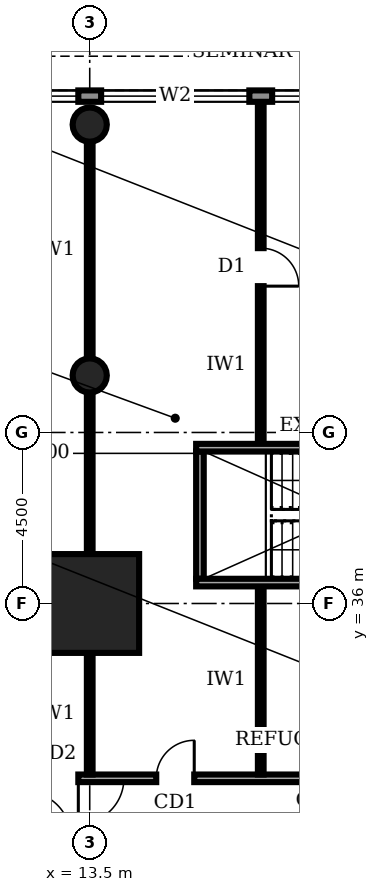
"""IFC4 building model, lengths in metres.
Left out: names, types, materials, properties, quantities, classifications, styles, units other than length and angle.
Written with IfcOpenShell. Run it as: python <this file> out.ifc"""

import sys

from ifc_helpers import new_model, si_unit, direction, frame, frame_2d, origin, origin_2d, place, context, subcontext, project, spatial, rectangle, circle, extrude, element, fill, save


model = new_model("IFC4")
c1 = context("Model", 3, precision=1e-05, world=origin(), true_north=direction((0.0, 1.0)))
c2 = subcontext(c1, "Body", "Model", "MODEL_VIEW")
j1 = project(units=[si_unit("LENGTHUNIT", "METRE"), si_unit("PLANEANGLEUNIT", "RADIAN")], contexts=[c1])
p1 = place(None, origin())
s1 = spatial("IfcSite", under=j1, at=p1, CompositionType="ELEMENT")
p2 = place(p1, origin())
s2 = spatial("IfcBuilding", under=s1, at=p2, CompositionType="ELEMENT")
p3 = place(p2, frame((0.0, 0.0, 6.0)))
s3 = spatial("IfcBuildingStorey", under=s2, at=p3, CompositionType="ELEMENT", Elevation=6.0)
p4 = place(p3, frame((13.5, 36.0, 0.0), z_axis=(0.0, 0.0, 1.0), x_axis=(1.0, 0.0, 0.0)))
e1 = element("IfcColumn", 1, at=p4, inside=s3, PredefinedType="COLUMN", context=c2, shape_type="SweptSolid", body=[
    extrude(rectangle(XDim=2.6, YDim=2.6, at=origin_2d()), origin(), (0.0, 0.0, 1.0), 5.0),
])
for number, where, z_axis, x_axis in (
    (2, (13.5, 42.0, 0.0), (0.0, 0.0, 1.0), (1.0, 0.0, 0.0)),
    (3, (13.5, 48.6, 0.0), (0.0, 0.0, 1.0), (1.0, 0.0, 0.0)),
):
    element("IfcColumn", number, at=place(p3, frame(where, z_axis=z_axis, x_axis=x_axis)), inside=s3, PredefinedType="COLUMN", context=c2, shape_type="SweptSolid", body=[
        extrude(circle(Radius=0.45, at=origin_2d()), origin(), (0.0, 0.0, 1.0), 5.0),
    ])
p5 = place(p3, frame((98.98, 49.35, 0.0), z_axis=(0.0, 0.0, 1.0), x_axis=(-1.0, 0.0, 0.0)))
e4 = element("IfcWall", 4, at=p5, inside=s3, PredefinedType="STANDARD", context=c2, shape_type="SweptSolid", body=[
    extrude(rectangle(XDim=98.96, YDim=0.3, at=frame_2d((49.48, 0.0))), origin(), (0.0, 0.0, 1.0), 4.7),
])
p6 = place(p5, frame((94.78, 0.0, 0.6)))
e5 = element("IfcOpeningElement", 5, at=p6, cuts=e4, PredefinedType="OPENING", context=c2, shape_type="SweptSolid", body=[
    extrude(rectangle(XDim=3.9, YDim=2.6, at=frame_2d((1.95, 1.3))), frame((0.0, 0.16, 0.0), z_axis=(0.0, -1.0, 0.0), x_axis=(1.0, 0.0, 0.0)), (0.0, 0.0, 1.0), 0.32),
])
p7 = place(p5, frame((90.28, 0.0, 0.6)))
e6 = element("IfcOpeningElement", 6, at=p7, cuts=e4, PredefinedType="OPENING", context=c2, shape_type="SweptSolid", body=[
    extrude(rectangle(XDim=3.9, YDim=2.6, at=frame_2d((1.95, 1.3))), frame((0.0, 0.16, 0.0), z_axis=(0.0, -1.0, 0.0), x_axis=(1.0, 0.0, 0.0)), (0.0, 0.0, 1.0), 0.32),
])
p8 = place(p5, frame((85.78, 0.0, 0.6)))
e7 = element("IfcOpeningElement", 7, at=p8, cuts=e4, PredefinedType="OPENING", context=c2, shape_type="SweptSolid", body=[
    extrude(rectangle(XDim=3.9, YDim=2.6, at=frame_2d((1.95, 1.3))), frame((0.0, 0.16, 0.0), z_axis=(0.0, -1.0, 0.0), x_axis=(1.0, 0.0, 0.0)), (0.0, 0.0, 1.0), 0.32),
])
p9 = place(p5, frame((81.28, 0.0, 0.6)))
e8 = element("IfcOpeningElement", 8, at=p9, cuts=e4, PredefinedType="OPENING", context=c2, shape_type="SweptSolid", body=[
    extrude(rectangle(XDim=3.9, YDim=2.6, at=frame_2d((1.95, 1.3))), frame((0.0, 0.16, 0.0), z_axis=(0.0, -1.0, 0.0), x_axis=(1.0, 0.0, 0.0)), (0.0, 0.0, 1.0), 0.32),
])
p10 = place(p5, frame((76.78, 0.0, 0.6)))
e9 = element("IfcOpeningElement", 9, at=p10, cuts=e4, PredefinedType="OPENING", context=c2, shape_type="SweptSolid", body=[
    extrude(rectangle(XDim=3.9, YDim=2.6, at=frame_2d((1.95, 1.3))), frame((0.0, 0.16, 0.0), z_axis=(0.0, -1.0, 0.0), x_axis=(1.0, 0.0, 0.0)), (0.0, 0.0, 1.0), 0.32),
])
p11 = place(p5, frame((72.28, 0.0, 0.6)))
e10 = element("IfcOpeningElement", 10, at=p11, cuts=e4, PredefinedType="OPENING", context=c2, shape_type="SweptSolid", body=[
    extrude(rectangle(XDim=3.9, YDim=2.6, at=frame_2d((1.95, 1.3))), frame((0.0, 0.16, 0.0), z_axis=(0.0, -1.0, 0.0), x_axis=(1.0, 0.0, 0.0)), (0.0, 0.0, 1.0), 0.32),
])
p12 = place(p5, frame((67.78, 0.0, 0.6)))
e11 = element("IfcOpeningElement", 11, at=p12, cuts=e4, PredefinedType="OPENING", context=c2, shape_type="SweptSolid", body=[
    extrude(rectangle(XDim=3.9, YDim=2.6, at=frame_2d((1.95, 1.3))), frame((0.0, 0.16, 0.0), z_axis=(0.0, -1.0, 0.0), x_axis=(1.0, 0.0, 0.0)), (0.0, 0.0, 1.0), 0.32),
])
p13 = place(p5, frame((63.28, 0.0, 0.6)))
e12 = element("IfcOpeningElement", 12, at=p13, cuts=e4, PredefinedType="OPENING", context=c2, shape_type="SweptSolid", body=[
    extrude(rectangle(XDim=3.9, YDim=2.6, at=frame_2d((1.95, 1.3))), frame((0.0, 0.16, 0.0), z_axis=(0.0, -1.0, 0.0), x_axis=(1.0, 0.0, 0.0)), (0.0, 0.0, 1.0), 0.32),
])
p14 = place(p5, frame((58.78, 0.0, 0.6)))
e13 = element("IfcOpeningElement", 13, at=p14, cuts=e4, PredefinedType="OPENING", context=c2, shape_type="SweptSolid", body=[
    extrude(rectangle(XDim=3.9, YDim=2.6, at=frame_2d((1.95, 1.3))), frame((0.0, 0.16, 0.0), z_axis=(0.0, -1.0, 0.0), x_axis=(1.0, 0.0, 0.0)), (0.0, 0.0, 1.0), 0.32),
])
p15 = place(p5, frame((54.28, 0.0, 0.6)))
e14 = element("IfcOpeningElement", 14, at=p15, cuts=e4, PredefinedType="OPENING", context=c2, shape_type="SweptSolid", body=[
    extrude(rectangle(XDim=3.9, YDim=2.6, at=frame_2d((1.95, 1.3))), frame((0.0, 0.16, 0.0), z_axis=(0.0, -1.0, 0.0), x_axis=(1.0, 0.0, 0.0)), (0.0, 0.0, 1.0), 0.32),
])
p16 = place(p5, frame((49.78, 0.0, 0.6)))
e15 = element("IfcOpeningElement", 15, at=p16, cuts=e4, PredefinedType="OPENING", context=c2, shape_type="SweptSolid", body=[
    extrude(rectangle(XDim=3.9, YDim=2.6, at=frame_2d((1.95, 1.3))), frame((0.0, 0.16, 0.0), z_axis=(0.0, -1.0, 0.0), x_axis=(1.0, 0.0, 0.0)), (0.0, 0.0, 1.0), 0.32),
])
p17 = place(p5, frame((45.28, 0.0, 0.6)))
e16 = element("IfcOpeningElement", 16, at=p17, cuts=e4, PredefinedType="OPENING", context=c2, shape_type="SweptSolid", body=[
    extrude(rectangle(XDim=3.9, YDim=2.6, at=frame_2d((1.95, 1.3))), frame((0.0, 0.16, 0.0), z_axis=(0.0, -1.0, 0.0), x_axis=(1.0, 0.0, 0.0)), (0.0, 0.0, 1.0), 0.32),
])
p18 = place(p5, frame((40.78, 0.0, 0.6)))
e17 = element("IfcOpeningElement", 17, at=p18, cuts=e4, PredefinedType="OPENING", context=c2, shape_type="SweptSolid", body=[
    extrude(rectangle(XDim=3.9, YDim=2.6, at=frame_2d((1.95, 1.3))), frame((0.0, 0.16, 0.0), z_axis=(0.0, -1.0, 0.0), x_axis=(1.0, 0.0, 0.0)), (0.0, 0.0, 1.0), 0.32),
])
p19 = place(p5, frame((36.28, 0.0, 0.6)))
e18 = element("IfcOpeningElement", 18, at=p19, cuts=e4, PredefinedType="OPENING", context=c2, shape_type="SweptSolid", body=[
    extrude(rectangle(XDim=3.9, YDim=2.6, at=frame_2d((1.95, 1.3))), frame((0.0, 0.16, 0.0), z_axis=(0.0, -1.0, 0.0), x_axis=(1.0, 0.0, 0.0)), (0.0, 0.0, 1.0), 0.32),
])
p20 = place(p5, frame((31.78, 0.0, 0.6)))
e19 = element("IfcOpeningElement", 19, at=p20, cuts=e4, PredefinedType="OPENING", context=c2, shape_type="SweptSolid", body=[
    extrude(rectangle(XDim=3.9, YDim=2.6, at=frame_2d((1.95, 1.3))), frame((0.0, 0.16, 0.0), z_axis=(0.0, -1.0, 0.0), x_axis=(1.0, 0.0, 0.0)), (0.0, 0.0, 1.0), 0.32),
])
p21 = place(p5, frame((27.28, 0.0, 0.6)))
e20 = element("IfcOpeningElement", 20, at=p21, cuts=e4, PredefinedType="OPENING", context=c2, shape_type="SweptSolid", body=[
    extrude(rectangle(XDim=3.9, YDim=2.6, at=frame_2d((1.95, 1.3))), frame((0.0, 0.16, 0.0), z_axis=(0.0, -1.0, 0.0), x_axis=(1.0, 0.0, 0.0)), (0.0, 0.0, 1.0), 0.32),
])
p22 = place(p5, frame((22.78, 0.0, 0.6)))
e21 = element("IfcOpeningElement", 21, at=p22, cuts=e4, PredefinedType="OPENING", context=c2, shape_type="SweptSolid", body=[
    extrude(rectangle(XDim=3.9, YDim=2.6, at=frame_2d((1.95, 1.3))), frame((0.0, 0.16, 0.0), z_axis=(0.0, -1.0, 0.0), x_axis=(1.0, 0.0, 0.0)), (0.0, 0.0, 1.0), 0.32),
])
p23 = place(p5, frame((18.28, 0.0, 0.6)))
e22 = element("IfcOpeningElement", 22, at=p23, cuts=e4, PredefinedType="OPENING", context=c2, shape_type="SweptSolid", body=[
    extrude(rectangle(XDim=3.9, YDim=2.6, at=frame_2d((1.95, 1.3))), frame((0.0, 0.16, 0.0), z_axis=(0.0, -1.0, 0.0), x_axis=(1.0, 0.0, 0.0)), (0.0, 0.0, 1.0), 0.32),
])
p24 = place(p5, frame((13.78, 0.0, 0.6)))
e23 = element("IfcOpeningElement", 23, at=p24, cuts=e4, PredefinedType="OPENING", context=c2, shape_type="SweptSolid", body=[
    extrude(rectangle(XDim=3.9, YDim=2.6, at=frame_2d((1.95, 1.3))), frame((0.0, 0.16, 0.0), z_axis=(0.0, -1.0, 0.0), x_axis=(1.0, 0.0, 0.0)), (0.0, 0.0, 1.0), 0.32),
])
p25 = place(p5, frame((9.28, 0.0, 0.6)))
e24 = element("IfcOpeningElement", 24, at=p25, cuts=e4, PredefinedType="OPENING", context=c2, shape_type="SweptSolid", body=[
    extrude(rectangle(XDim=3.9, YDim=2.6, at=frame_2d((1.95, 1.3))), frame((0.0, 0.16, 0.0), z_axis=(0.0, -1.0, 0.0), x_axis=(1.0, 0.0, 0.0)), (0.0, 0.0, 1.0), 0.32),
])
p26 = place(p5, frame((4.78, 0.0, 0.6)))
e25 = element("IfcOpeningElement", 25, at=p26, cuts=e4, PredefinedType="OPENING", context=c2, shape_type="SweptSolid", body=[
    extrude(rectangle(XDim=3.9, YDim=2.6, at=frame_2d((1.95, 1.3))), frame((0.0, 0.16, 0.0), z_axis=(0.0, -1.0, 0.0), x_axis=(1.0, 0.0, 0.0)), (0.0, 0.0, 1.0), 0.32),
])
p27 = place(p3, frame((28.6, 31.4, 0.0), z_axis=(0.0, 0.0, 1.0), x_axis=(-1.0, 0.0, 0.0)))
e26 = element("IfcWall", 26, at=p27, inside=s3, PredefinedType="SOLIDWALL", context=c2, shape_type="SweptSolid", body=[
    extrude(rectangle(XDim=16.9, YDim=0.2, at=frame_2d((8.45, 0.0))), origin(), (0.0, 0.0, 1.0), 4.7),
])
p28 = place(p27, frame((15.4, 0.0, 0.0)))
e27 = element("IfcOpeningElement", 27, at=p28, cuts=e26, PredefinedType="OPENING", context=c2, shape_type="SweptSolid", body=[
    extrude(rectangle(XDim=1.2, YDim=2.4, at=frame_2d((0.6, 1.2))), frame((0.0, 0.11, 0.0), z_axis=(0.0, -1.0, 0.0), x_axis=(1.0, 0.0, 0.0)), (0.0, 0.0, 1.0), 0.22),
])
p29 = place(p27, frame((12.35, 0.0, 0.0)))
e28 = element("IfcOpeningElement", 28, at=p29, cuts=e26, PredefinedType="OPENING", context=c2, shape_type="SweptSolid", body=[
    extrude(rectangle(XDim=1.0, YDim=2.1, at=frame_2d((0.5, 1.05))), frame((0.0, 0.11, 0.0), z_axis=(0.0, -1.0, 0.0), x_axis=(1.0, 0.0, 0.0)), (0.0, 0.0, 1.0), 0.22),
])
p30 = place(p27, frame((7.85, 0.0, 0.0)))
e29 = element("IfcOpeningElement", 29, at=p30, cuts=e26, PredefinedType="OPENING", context=c2, shape_type="SweptSolid", body=[
    extrude(rectangle(XDim=1.0, YDim=2.1, at=frame_2d((0.5, 1.05))), frame((0.0, 0.11, 0.0), z_axis=(0.0, -1.0, 0.0), x_axis=(1.0, 0.0, 0.0)), (0.0, 0.0, 1.0), 0.22),
])
p31 = place(p27, frame((0.275, 0.0, 0.0)))
e30 = element("IfcOpeningElement", 30, at=p31, cuts=e26, PredefinedType="OPENING", context=c2, shape_type="SweptSolid", body=[
    extrude(rectangle(XDim=1.0, YDim=2.1, at=frame_2d((0.5, 1.05))), frame((0.0, 0.11, 0.0), z_axis=(0.0, -1.0, 0.0), x_axis=(1.0, 0.0, 0.0)), (0.0, 0.0, 1.0), 0.22),
])
p32 = place(p27, frame((3.35, 0.0, 0.0)))
e31 = element("IfcOpeningElement", 31, at=p32, cuts=e26, PredefinedType="OPENING", context=c2, shape_type="SweptSolid", body=[
    extrude(rectangle(XDim=1.0, YDim=2.1, at=frame_2d((0.5, 1.05))), frame((0.0, 0.11, 0.0), z_axis=(0.0, -1.0, 0.0), x_axis=(1.0, 0.0, 0.0)), (0.0, 0.0, 1.0), 0.22),
])
p33 = place(p3, frame((13.5, 31.5, 0.0), z_axis=(0.0, 0.0, 1.0), x_axis=(0.0, 1.0, 0.0)))
e32 = element("IfcWall", 32, at=p33, inside=s3, PredefinedType="PARTITIONING", context=c2, shape_type="SweptSolid", body=[
    extrude(rectangle(XDim=3.18, YDim=0.15, at=frame_2d((1.59, 0.0))), origin(), (0.0, 0.0, 1.0), 3.8),
])
p34 = place(p3, frame((13.5, 37.32, 0.0), z_axis=(0.0, 0.0, 1.0), x_axis=(0.0, 1.0, 0.0)))
e33 = element("IfcWall", 33, at=p34, inside=s3, PredefinedType="PARTITIONING", context=c2, shape_type="SweptSolid", body=[
    extrude(rectangle(XDim=4.21, YDim=0.15, at=frame_2d((2.105, 0.0))), origin(), (0.0, 0.0, 1.0), 3.7),
])
p35 = place(p3, frame((13.5, 42.47, 0.0), z_axis=(0.0, 0.0, 1.0), x_axis=(0.0, 1.0, 0.0)))
e34 = element("IfcWall", 34, at=p35, inside=s3, PredefinedType="PARTITIONING", context=c2, shape_type="SweptSolid", body=[
    extrude(rectangle(XDim=5.66, YDim=0.15, at=frame_2d((2.83, 0.0))), origin(), (0.0, 0.0, 1.0), 3.7),
])
p36 = place(p3, frame((18.0, 31.5, 0.0), z_axis=(0.0, 0.0, 1.0), x_axis=(0.0, 1.0, 0.0)))
e35 = element("IfcWall", 35, at=p36, inside=s3, PredefinedType="PARTITIONING", context=c2, shape_type="SweptSolid", body=[
    extrude(rectangle(XDim=4.95, YDim=0.15, at=frame_2d((2.475, 0.0))), origin(), (0.0, 0.0, 1.0), 4.7),
])
p37 = place(p3, frame((18.0, 40.2, 0.0), z_axis=(0.0, 0.0, 1.0), x_axis=(0.0, 1.0, 0.0)))
e36 = element("IfcWall", 36, at=p37, inside=s3, PredefinedType="PARTITIONING", context=c2, shape_type="SweptSolid", body=[
    extrude(rectangle(XDim=9.0, YDim=0.15, at=frame_2d((4.5, 0.0))), origin(), (0.0, 0.0, 1.0), 4.7),
])
p38 = place(p37, frame((4.15, 0.0, 0.0)))
e37 = element("IfcOpeningElement", 37, at=p38, cuts=e36, PredefinedType="OPENING", context=c2, shape_type="SweptSolid", body=[
    extrude(rectangle(XDim=1.0, YDim=2.1, at=frame_2d((0.5, 1.05))), frame((0.0, 0.085, 0.0), z_axis=(0.0, -1.0, 0.0), x_axis=(1.0, 0.0, 0.0)), (0.0, 0.0, 1.0), 0.17),
])
p39 = place(p3, frame((16.3, 36.55, 0.0), z_axis=(0.0, 0.0, 1.0), x_axis=(1.0, 0.0, 0.0)))
e38 = element("IfcWall", 38, at=p39, inside=s3, PredefinedType="SOLIDWALL", context=c2, shape_type="SweptSolid", body=[
    extrude(rectangle(XDim=7.9, YDim=0.2, at=frame_2d((3.95, 0.0))), origin(), (0.0, 0.0, 1.0), 4.7),
])
p40 = place(p39, frame((6.3, 0.0, 0.0)))
e39 = element("IfcOpeningElement", 39, at=p40, cuts=e38, PredefinedType="OPENING", context=c2, shape_type="SweptSolid", body=[
    extrude(rectangle(XDim=1.0, YDim=2.1, at=frame_2d((0.5, 1.05))), frame((0.0, 0.11, 0.0), z_axis=(0.0, -1.0, 0.0), x_axis=(1.0, 0.0, 0.0)), (0.0, 0.0, 1.0), 0.22),
])
p41 = place(p3, frame((16.3, 40.1, 0.0), z_axis=(0.0, 0.0, 1.0), x_axis=(1.0, 0.0, 0.0)))
e40 = element("IfcWall", 40, at=p41, inside=s3, PredefinedType="SOLIDWALL", context=c2, shape_type="SweptSolid", body=[
    extrude(rectangle(XDim=7.9, YDim=0.2, at=frame_2d((3.95, 0.0))), origin(), (0.0, 0.0, 1.0), 4.7),
])
p42 = place(p3, frame((16.4, 36.65, 0.0), z_axis=(0.0, 0.0, 1.0), x_axis=(0.0, 1.0, 0.0)))
e41 = element("IfcWall", 41, at=p42, inside=s3, PredefinedType="SOLIDWALL", context=c2, shape_type="SweptSolid", body=[
    extrude(rectangle(XDim=3.35, YDim=0.2, at=frame_2d((1.675, 0.0))), origin(), (0.0, 0.0, 1.0), 4.7),
])
p43 = place(p8, origin())
e42 = element("IfcWindow", 42, at=p43, inside=s3, PartitioningType="SINGLE_PANEL", PredefinedType="WINDOW", context=c2, shape_type="SweptSolid", body=[
    extrude(rectangle(XDim=3.9, YDim=2.6, at=frame_2d((1.95, 1.3))), frame((0.0, 0.03, 0.0), z_axis=(0.0, -1.0, 0.0), x_axis=(1.0, 0.0, 0.0)), (0.0, 0.0, 1.0), 0.06),
])
fill(e7, e42)
p44 = place(p9, origin())
e43 = element("IfcWindow", 43, at=p44, inside=s3, PartitioningType="SINGLE_PANEL", PredefinedType="WINDOW", context=c2, shape_type="SweptSolid", body=[
    extrude(rectangle(XDim=3.9, YDim=2.6, at=frame_2d((1.95, 1.3))), frame((0.0, 0.03, 0.0), z_axis=(0.0, -1.0, 0.0), x_axis=(1.0, 0.0, 0.0)), (0.0, 0.0, 1.0), 0.06),
])
fill(e8, e43)
p45 = place(p10, origin())
e44 = element("IfcWindow", 44, at=p45, inside=s3, PartitioningType="SINGLE_PANEL", PredefinedType="WINDOW", context=c2, shape_type="SweptSolid", body=[
    extrude(rectangle(XDim=3.9, YDim=2.6, at=frame_2d((1.95, 1.3))), frame((0.0, 0.03, 0.0), z_axis=(0.0, -1.0, 0.0), x_axis=(1.0, 0.0, 0.0)), (0.0, 0.0, 1.0), 0.06),
])
fill(e9, e44)
p46 = place(p28, origin())
e45 = element("IfcDoor", 45, at=p46, inside=s3, OperationType="SINGLE_SWING_LEFT", PredefinedType="DOOR", context=c2, shape_type="SweptSolid", body=[
    extrude(rectangle(XDim=1.2, YDim=2.4, at=frame_2d((0.6, 1.2))), frame((0.0, 0.025, 0.0), z_axis=(0.0, -1.0, 0.0), x_axis=(1.0, 0.0, 0.0)), (0.0, 0.0, 1.0), 0.05),
])
fill(e27, e45)
p47 = place(p29, frame((1.0, 0.0, 0.0), z_axis=(0.0, 0.0, 1.0), x_axis=(-1.0, 0.0, 0.0)))
e46 = element("IfcDoor", 46, at=p47, inside=s3, OperationType="SINGLE_SWING_RIGHT", PredefinedType="DOOR", context=c2, shape_type="SweptSolid", body=[
    extrude(rectangle(XDim=1.0, YDim=2.1, at=frame_2d((0.5, 1.05))), frame((0.0, 0.025, 0.0), z_axis=(0.0, -1.0, 0.0), x_axis=(1.0, 0.0, 0.0)), (0.0, 0.0, 1.0), 0.05),
])
fill(e28, e46)
p48 = place(p38, frame((1.0, 0.0, 0.0), z_axis=(0.0, 0.0, 1.0), x_axis=(-1.0, 0.0, 0.0)))
e47 = element("IfcDoor", 47, at=p48, inside=s3, OperationType="SINGLE_SWING_RIGHT", PredefinedType="DOOR", context=c2, shape_type="SweptSolid", body=[
    extrude(rectangle(XDim=1.0, YDim=2.1, at=frame_2d((0.5, 1.05))), frame((0.0, 0.025, 0.0), z_axis=(0.0, -1.0, 0.0), x_axis=(1.0, 0.0, 0.0)), (0.0, 0.0, 1.0), 0.05),
])
fill(e37, e47)
save(model, sys.argv[1])
